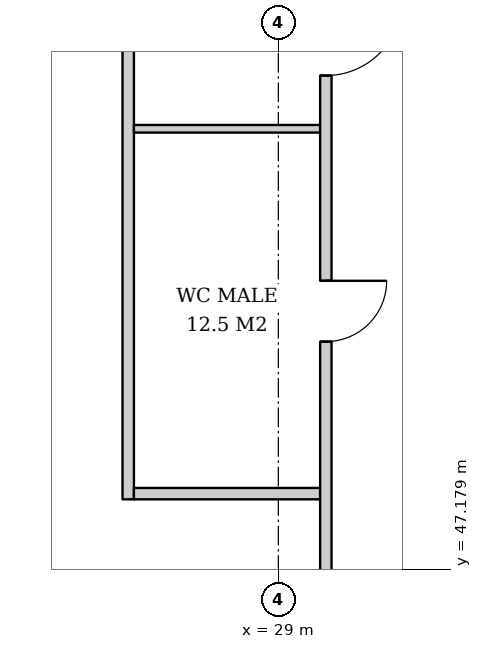
"""IFC4 building model, lengths in metres.
Left out: names, types, materials, properties, quantities, classifications, styles, units other than length and angle.
Written with IfcOpenShell. Run it as: python <this file> out.ifc"""

import sys

from ifc_helpers import new_model, si_unit, direction, frame, frame_2d, origin, place, context, subcontext, project, spatial, rectangle, extrude, element, fill, save


model = new_model("IFC4")
c1 = context("Model", 3, precision=1e-05, world=origin(), true_north=direction((0.0, 1.0)))
c2 = subcontext(c1, "Body", "Model", "MODEL_VIEW")
j1 = project(units=[si_unit("LENGTHUNIT", "METRE"), si_unit("PLANEANGLEUNIT", "RADIAN")], contexts=[c1])
p1 = place(None, origin())
s1 = spatial("IfcSite", under=j1, at=p1, CompositionType="ELEMENT")
p2 = place(p1, origin())
s2 = spatial("IfcBuilding", under=s1, at=p2, CompositionType="ELEMENT")
p3 = place(p2, frame((0.0, 0.0, 59.0)))
s3 = spatial("IfcBuildingStorey", under=s2, at=p3, CompositionType="ELEMENT", Elevation=59.0)
p4 = place(p3, frame((27.025, 60.25, 0.0), z_axis=(0.0, 0.0, 1.0), x_axis=(0.0, -1.0, 0.0)))
e1 = element("IfcWall", 1, at=p4, inside=s3, PredefinedType="PARTITIONING", context=c2, shape_type="SweptSolid", body=[
    extrude(rectangle(XDim=12.15, YDim=0.15, at=frame_2d((6.075, 0.0))), origin(), (0.0, 0.0, 1.0), 2.612),
])
p5 = place(p3, frame((29.55, 52.975, 0.0), z_axis=(0.0, 0.0, 1.0), x_axis=(-1.0, 0.0, 0.0)))
e2 = element("IfcWall", 2, at=p5, inside=s3, PredefinedType="SOLIDWALL", context=c2, shape_type="SweptSolid", body=[
    extrude(rectangle(XDim=2.45, YDim=0.1, at=frame_2d((1.225, 0.0))), origin(), (0.0, 0.0, 1.0), 3.62),
])
p6 = place(p3, frame((29.55, 48.175, 0.0), z_axis=(0.0, 0.0, 1.0), x_axis=(-1.0, 0.0, 0.0)))
e3 = element("IfcWall", 3, at=p6, inside=s3, PredefinedType="PARTITIONING", context=c2, shape_type="SweptSolid", body=[
    extrude(rectangle(XDim=2.45, YDim=0.15, at=frame_2d((1.225, 0.0))), origin(), (0.0, 0.0, 1.0), 3.62),
])
p7 = place(p3, frame((29.625, 61.45, 0.0), z_axis=(0.0, 0.0, 1.0), x_axis=(0.0, -1.0, 0.0)))
e4 = element("IfcWall", 4, at=p7, inside=s3, PredefinedType="PARTITIONING", context=c2, shape_type="SweptSolid", body=[
    extrude(rectangle(XDim=30.75, YDim=0.15, at=frame_2d((15.375, 0.0))), origin(), (0.0, 0.0, 1.0), 2.612),
])
p8 = place(p7, frame((3.275, 0.0, 0.0)))
e5 = element("IfcOpeningElement", 5, at=p8, cuts=e4, PredefinedType="OPENING", context=c2, shape_type="SweptSolid", body=[
    extrude(rectangle(XDim=0.8, YDim=2.1, at=frame_2d((0.4, 1.05))), frame((0.0, 0.085, 0.0), z_axis=(0.0, -1.0, 0.0), x_axis=(1.0, 0.0, 0.0)), (0.0, 0.0, 1.0), 0.17),
])
p9 = place(p7, frame((6.775, 0.0, 0.0)))
e6 = element("IfcOpeningElement", 6, at=p9, cuts=e4, PredefinedType="OPENING", context=c2, shape_type="SweptSolid", body=[
    extrude(rectangle(XDim=1.0, YDim=2.1, at=frame_2d((0.5, 1.05))), frame((0.0, 0.085, 0.0), z_axis=(0.0, -1.0, 0.0), x_axis=(1.0, 0.0, 0.0)), (0.0, 0.0, 1.0), 0.17),
])
p10 = place(p7, frame((10.475, 0.0, 0.0)))
e7 = element("IfcOpeningElement", 7, at=p10, cuts=e4, PredefinedType="OPENING", context=c2, shape_type="SweptSolid", body=[
    extrude(rectangle(XDim=0.8, YDim=2.1, at=frame_2d((0.4, 1.05))), frame((0.0, 0.085, 0.0), z_axis=(0.0, -1.0, 0.0), x_axis=(1.0, 0.0, 0.0)), (0.0, 0.0, 1.0), 0.17),
])
p11 = place(p9, origin())
e8 = element("IfcDoor", 8, at=p11, inside=s3, OperationType="SINGLE_SWING_LEFT", PredefinedType="DOOR", context=c2, shape_type="SweptSolid", body=[
    extrude(rectangle(XDim=1.0, YDim=2.1, at=frame_2d((0.5, 1.05))), frame((0.0, 0.025, 0.0), z_axis=(0.0, -1.0, 0.0), x_axis=(1.0, 0.0, 0.0)), (0.0, 0.0, 1.0), 0.05),
])
fill(e6, e8)
p12 = place(p10, origin())
e9 = element("IfcDoor", 9, at=p12, inside=s3, OperationType="SINGLE_SWING_LEFT", PredefinedType="DOOR", context=c2, shape_type="SweptSolid", body=[
    extrude(rectangle(XDim=0.8, YDim=2.1, at=frame_2d((0.4, 1.05))), frame((0.0, 0.025, 0.0), z_axis=(0.0, -1.0, 0.0), x_axis=(1.0, 0.0, 0.0)), (0.0, 0.0, 1.0), 0.05),
])
fill(e7, e9)
save(model, sys.argv[1])
